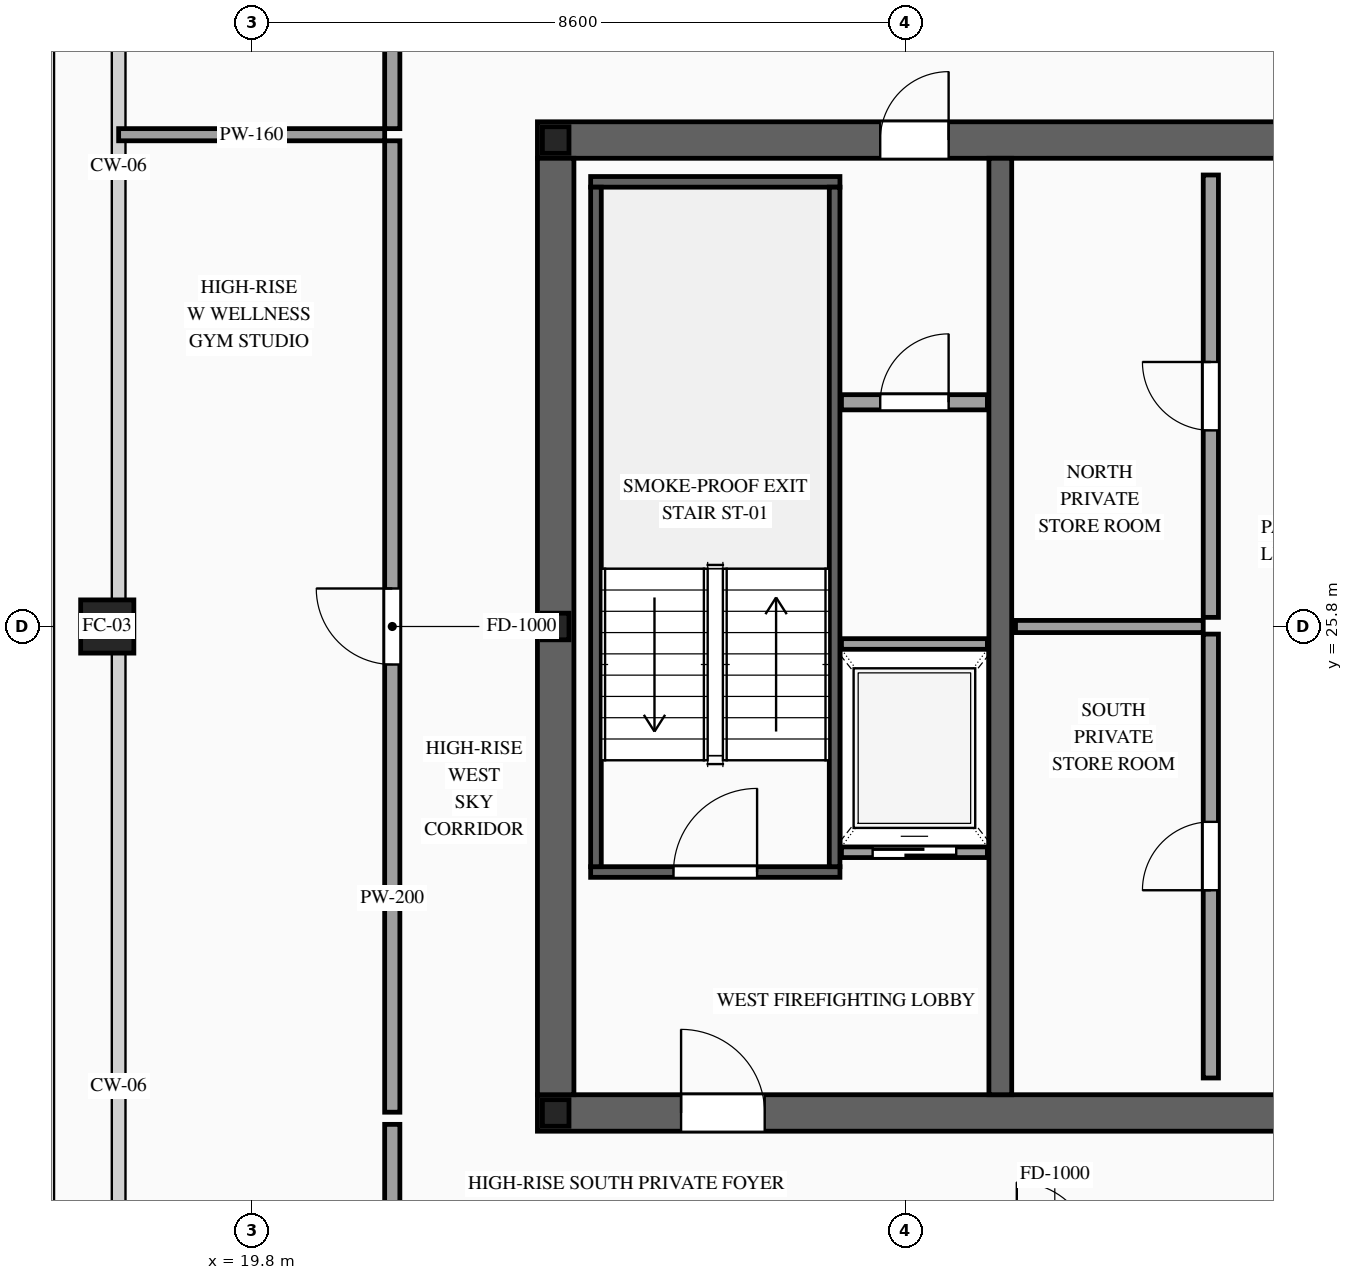
"""IFC4 building model, lengths in metres.
Left out: names, types, materials, properties, quantities, classifications, styles, units other than length and angle.
Written with IfcOpenShell. Run it as: python <this file> out.ifc"""

import sys

from ifc_helpers import new_model, si_unit, direction, frame, frame_2d, origin, origin_2d, place, context, subcontext, project, spatial, rectangle, hollow_rectangle, i_section, extrude, source, transform, mapped, element, fill, save


model = new_model("IFC4")
c1 = context("Model", 3, precision=1e-05, world=origin(), true_north=direction((0.0, 1.0)))
c2 = subcontext(c1, "Body", "Model", "MODEL_VIEW")
j1 = project(units=[si_unit("LENGTHUNIT", "METRE"), si_unit("PLANEANGLEUNIT", "RADIAN")], contexts=[c1])
p1 = place(None, origin())
s1 = spatial("IfcSite", under=j1, at=p1, CompositionType="ELEMENT")
p2 = place(p1, origin())
s2 = spatial("IfcBuilding", under=s1, at=p2, CompositionType="ELEMENT")
p3 = place(p2, frame((0.0, 0.0, 303.1)))
s3 = spatial("IfcBuildingStorey", under=s2, at=p3, CompositionType="ELEMENT", Elevation=303.1)
p4 = place(p3, frame((23.56, 19.4, 0.0), z_axis=(0.0, 0.0, 1.0), x_axis=(1.0, 0.0, 0.0)))
e1 = element("IfcWall", 1, at=p4, inside=s3, PredefinedType="SHEAR", context=c2, shape_type="SweptSolid", body=[
    extrude(rectangle(XDim=26.88, YDim=0.48, at=frame_2d((13.44, 0.0))), origin(), (0.0, 0.0, 1.0), 3.5),
])
p5 = place(p4, frame((1.89, 0.0, 0.0)))
e2 = element("IfcOpeningElement", 2, at=p5, cuts=e1, PredefinedType="OPENING", context=c2, shape_type="SweptSolid", body=[
    extrude(rectangle(XDim=1.1, YDim=2.2, at=frame_2d((0.55, 1.1))), frame((0.0, 0.255, 0.0), z_axis=(0.0, -1.0, 0.0), x_axis=(1.0, 0.0, 0.0)), (0.0, 0.0, 1.0), 0.51),
])
p6 = place(p4, frame((9.79, 0.0, 0.0)))
e3 = element("IfcOpeningElement", 3, at=p6, cuts=e1, PredefinedType="OPENING", context=c2, shape_type="SweptSolid", body=[
    extrude(rectangle(XDim=1.1, YDim=2.2, at=frame_2d((0.55, 1.1))), frame((0.0, 0.255, 0.0), z_axis=(0.0, -1.0, 0.0), x_axis=(1.0, 0.0, 0.0)), (0.0, 0.0, 1.0), 0.51),
])
p7 = place(p4, frame((22.99, 0.0, 0.0)))
e4 = element("IfcOpeningElement", 4, at=p7, cuts=e1, PredefinedType="OPENING", context=c2, shape_type="SweptSolid", body=[
    extrude(rectangle(XDim=1.1, YDim=2.2, at=frame_2d((0.55, 1.1))), frame((0.0, 0.255, 0.0), z_axis=(0.0, -1.0, 0.0), x_axis=(1.0, 0.0, 0.0)), (0.0, 0.0, 1.0), 0.51),
])
p8 = place(p4, frame((19.61, 0.0, 0.0)))
e5 = element("IfcOpeningElement", 5, at=p8, cuts=e1, PredefinedType="OPENING", context=c2, shape_type="SweptSolid", body=[
    extrude(rectangle(XDim=0.9, YDim=2.15, at=frame_2d((0.45, 1.075))), frame((0.0, 0.255, 0.0), z_axis=(0.0, -1.0, 0.0), x_axis=(1.0, 0.0, 0.0)), (0.0, 0.0, 1.0), 0.51),
])
p9 = place(p4, frame((18.17, 0.0, 0.0)))
e6 = element("IfcOpeningElement", 6, at=p9, cuts=e1, PredefinedType="OPENING", context=c2, shape_type="SweptSolid", body=[
    extrude(rectangle(XDim=0.9, YDim=2.15, at=frame_2d((0.45, 1.075))), frame((0.0, 0.255, 0.0), z_axis=(0.0, -1.0, 0.0), x_axis=(1.0, 0.0, 0.0)), (0.0, 0.0, 1.0), 0.51),
])
p10 = place(p3, frame((23.56, 32.2, 0.0), z_axis=(0.0, 0.0, 1.0), x_axis=(1.0, 0.0, 0.0)))
e7 = element("IfcWall", 7, at=p10, inside=s3, PredefinedType="SHEAR", context=c2, shape_type="SweptSolid", body=[
    extrude(rectangle(XDim=26.88, YDim=0.48, at=frame_2d((13.44, 0.0))), origin(), (0.0, 0.0, 1.0), 3.5),
])
p11 = place(p10, frame((4.51, 0.0, 0.0)))
e8 = element("IfcOpeningElement", 8, at=p11, cuts=e7, PredefinedType="OPENING", context=c2, shape_type="SweptSolid", body=[
    extrude(rectangle(XDim=0.9, YDim=2.15, at=frame_2d((0.45, 1.075))), frame((0.0, 0.255, 0.0), z_axis=(0.0, -1.0, 0.0), x_axis=(1.0, 0.0, 0.0)), (0.0, 0.0, 1.0), 0.51),
])
p12 = place(p10, frame((9.79, 0.0, 0.0)))
e9 = element("IfcOpeningElement", 9, at=p12, cuts=e7, PredefinedType="OPENING", context=c2, shape_type="SweptSolid", body=[
    extrude(rectangle(XDim=1.1, YDim=2.2, at=frame_2d((0.55, 1.1))), frame((0.0, 0.255, 0.0), z_axis=(0.0, -1.0, 0.0), x_axis=(1.0, 0.0, 0.0)), (0.0, 0.0, 1.0), 0.51),
])
p13 = place(p10, frame((15.64, 0.0, 0.0)))
e10 = element("IfcOpeningElement", 10, at=p13, cuts=e7, PredefinedType="OPENING", context=c2, shape_type="SweptSolid", body=[
    extrude(rectangle(XDim=1.1, YDim=2.2, at=frame_2d((0.55, 1.1))), frame((0.0, 0.255, 0.0), z_axis=(0.0, -1.0, 0.0), x_axis=(1.0, 0.0, 0.0)), (0.0, 0.0, 1.0), 0.51),
])
p14 = place(p10, frame((18.74, 0.0, 0.0)))
e11 = element("IfcOpeningElement", 11, at=p14, cuts=e7, PredefinedType="OPENING", context=c2, shape_type="SweptSolid", body=[
    extrude(rectangle(XDim=1.1, YDim=2.2, at=frame_2d((0.55, 1.1))), frame((0.0, 0.255, 0.0), z_axis=(0.0, -1.0, 0.0), x_axis=(1.0, 0.0, 0.0)), (0.0, 0.0, 1.0), 0.51),
])
m1 = source(origin(), c2, "Body", "SweptSolid", [
    extrude(rectangle(XDim=12.32, YDim=0.48, at=frame_2d((6.16, 0.0))), origin(), (0.0, 0.0, 1.0), 3.5),
])
p15 = place(p3, frame((23.8, 19.64, 0.0), z_axis=(0.0, 0.0, 1.0), x_axis=(0.0, 1.0, 0.0)))
e12 = element("IfcWall", 12, at=p15, inside=s3, PredefinedType="SHEAR", context=c2, shape_type="MappedRepresentation", body=[
    mapped(m1, transform((0.0, 0.0, 0.0), scale=1.0)),
])
m2 = source(origin(), c2, "Body", "SweptSolid", [
    extrude(rectangle(XDim=12.32, YDim=0.3, at=frame_2d((6.16, 0.0))), origin(), (0.0, 0.0, 1.0), 3.5),
])
p16 = place(p3, frame((29.65, 19.64, 0.0), z_axis=(0.0, 0.0, 1.0), x_axis=(0.0, 1.0, 0.0)))
e13 = element("IfcWall", 13, at=p16, inside=s3, PredefinedType="SOLIDWALL", context=c2, shape_type="MappedRepresentation", body=[
    mapped(m2, transform((0.0, 0.0, 0.0), scale=1.0)),
])
m3 = source(origin(), c2, "Body", "SweptSolid", [
    extrude(i_section(OverallWidth=0.35, OverallDepth=0.35, WebThickness=0.012, FlangeThickness=0.019, at=origin_2d()), origin(), (0.0, 0.0, 1.0), 3.5),
])
for number, where, z_axis, x_axis in (
    (14, (23.8, 19.4, 0.0), (0.0, 0.0, 1.0), (1.0, 0.0, 0.0)),
    (15, (23.8, 25.8, 0.0), (0.0, 0.0, 1.0), (1.0, 0.0, 0.0)),
    (16, (23.8, 32.2, 0.0), (0.0, 0.0, 1.0), (1.0, 0.0, 0.0)),
):
    element("IfcColumn", number, at=place(p3, frame(where, z_axis=z_axis, x_axis=x_axis)), inside=s3, PredefinedType="COLUMN", context=c2, shape_type="MappedRepresentation", body=[
        mapped(m3, transform((0.0, 0.0, 0.0), scale=1.0)),
    ])
m4 = source(origin(), c2, "Body", "SweptSolid", [
    extrude(hollow_rectangle(XDim=0.7, YDim=0.7, WallThickness=0.032, at=origin_2d()), origin(), (0.0, 0.0, 1.0), 3.5),
])
p17 = place(p3, frame((17.9, 25.8, 0.0), z_axis=(0.0, 0.0, 1.0), x_axis=(1.0, 0.0, 0.0)))
e17 = element("IfcColumn", 17, at=p17, inside=s3, PredefinedType="COLUMN", context=c2, shape_type="MappedRepresentation", body=[
    mapped(m4, transform((0.0, 0.0, 0.0), scale=1.0)),
])
p18 = place(p3, frame((27.56, 22.83, 0.0), z_axis=(0.0, 0.0, 1.0), x_axis=(1.0, 0.0, 0.0)))
e18 = element("IfcWall", 18, at=p18, inside=s3, PredefinedType="SOLIDWALL", context=c2, shape_type="SweptSolid", body=[
    extrude(rectangle(XDim=1.92, YDim=0.14, at=frame_2d((0.96, 0.0))), origin(), (0.0, 0.0, 1.0), 3.22),
])
p19 = place(p18, frame((0.41, 0.0, 0.0)))
e19 = element("IfcOpeningElement", 19, at=p19, cuts=e18, PredefinedType="OPENING", context=c2, shape_type="SweptSolid", body=[
    extrude(rectangle(XDim=1.1, YDim=2.2, at=frame_2d((0.55, 1.1))), frame((0.0, 0.085, 0.0), z_axis=(0.0, -1.0, 0.0), x_axis=(1.0, 0.0, 0.0)), (0.0, 0.0, 1.0), 0.17),
])
m5 = source(origin(), c2, "Body", "SweptSolid", [
    extrude(rectangle(XDim=1.92, YDim=0.14, at=frame_2d((0.96, 0.0))), origin(), (0.0, 0.0, 1.0), 3.22),
])
p20 = place(p3, frame((27.56, 25.57, 0.0), z_axis=(0.0, 0.0, 1.0), x_axis=(1.0, 0.0, 0.0)))
e20 = element("IfcWall", 20, at=p20, inside=s3, PredefinedType="SOLIDWALL", context=c2, shape_type="MappedRepresentation", body=[
    mapped(m5, transform((0.0, 0.0, 0.0), scale=1.0)),
])
p21 = place(p3, frame((24.26, 22.57, 0.0), z_axis=(0.0, 0.0, 1.0), x_axis=(1.0, 0.0, 0.0)))
e21 = element("IfcWall", 21, at=p21, inside=s3, PredefinedType="SOLIDWALL", context=c2, shape_type="SweptSolid", body=[
    extrude(rectangle(XDim=3.28, YDim=0.14, at=frame_2d((1.64, 0.0))), origin(), (0.0, 0.0, 1.0), 3.22),
])
p22 = place(p21, frame((1.09, 0.0, 0.0)))
e22 = element("IfcOpeningElement", 22, at=p22, cuts=e21, PredefinedType="OPENING", context=c2, shape_type="SweptSolid", body=[
    extrude(rectangle(XDim=1.1, YDim=2.2, at=frame_2d((0.55, 1.1))), frame((0.0, 0.085, 0.0), z_axis=(0.0, -1.0, 0.0), x_axis=(1.0, 0.0, 0.0)), (0.0, 0.0, 1.0), 0.17),
])
m6 = source(origin(), c2, "Body", "SweptSolid", [
    extrude(rectangle(XDim=3.28, YDim=0.14, at=frame_2d((1.64, 0.0))), origin(), (0.0, 0.0, 1.0), 3.22),
])
p23 = place(p3, frame((24.26, 31.65, 0.0), z_axis=(0.0, 0.0, 1.0), x_axis=(1.0, 0.0, 0.0)))
e23 = element("IfcWall", 23, at=p23, inside=s3, PredefinedType="SOLIDWALL", context=c2, shape_type="MappedRepresentation", body=[
    mapped(m6, transform((0.0, 0.0, 0.0), scale=1.0)),
])
m7 = source(origin(), c2, "Body", "SweptSolid", [
    extrude(rectangle(XDim=8.94, YDim=0.14, at=frame_2d((4.47, 0.0))), origin(), (0.0, 0.0, 1.0), 3.22),
])
for number, where, z_axis, x_axis in (
    (24, (24.33, 22.64, 0.0), (0.0, 0.0, 1.0), (0.0, 1.0, 0.0)),
    (25, (27.47, 22.64, 0.0), (0.0, 0.0, 1.0), (0.0, 1.0, 0.0)),
):
    element("IfcWall", number, at=place(p3, frame(where, z_axis=z_axis, x_axis=x_axis)), inside=s3, PredefinedType="SOLIDWALL", context=c2, shape_type="MappedRepresentation", body=[
        mapped(m7, transform((0.0, 0.0, 0.0), scale=1.0)),
    ])
p24 = place(p3, frame((27.56, 28.75, 0.0), z_axis=(0.0, 0.0, 1.0), x_axis=(1.0, 0.0, 0.0)))
e26 = element("IfcWall", 26, at=p24, inside=s3, PredefinedType="PARTITIONING", context=c2, shape_type="SweptSolid", body=[
    extrude(rectangle(XDim=1.92, YDim=0.2, at=frame_2d((0.96, 0.0))), origin(), (0.0, 0.0, 1.0), 3.22),
])
p25 = place(p24, frame((0.51, 0.0, 0.0)))
e27 = element("IfcOpeningElement", 27, at=p25, cuts=e26, PredefinedType="OPENING", context=c2, shape_type="SweptSolid", body=[
    extrude(rectangle(XDim=0.9, YDim=2.15, at=frame_2d((0.45, 1.075))), frame((0.0, 0.115, 0.0), z_axis=(0.0, -1.0, 0.0), x_axis=(1.0, 0.0, 0.0)), (0.0, 0.0, 1.0), 0.23),
])
p26 = place(p3, frame((32.42, 19.86, 0.0), z_axis=(0.0, 0.0, 1.0), x_axis=(0.0, 1.0, 0.0)))
e28 = element("IfcWall", 28, at=p26, inside=s3, PredefinedType="PARTITIONING", context=c2, shape_type="SweptSolid", body=[
    extrude(rectangle(XDim=5.84, YDim=0.2, at=frame_2d((2.92, 0.0))), origin(), (0.0, 0.0, 1.0), 3.22),
])
p27 = place(p26, frame((2.47, 0.0, 0.0)))
e29 = element("IfcOpeningElement", 29, at=p27, cuts=e28, PredefinedType="OPENING", context=c2, shape_type="SweptSolid", body=[
    extrude(rectangle(XDim=0.9, YDim=2.15, at=frame_2d((0.45, 1.075))), frame((0.0, 0.115, 0.0), z_axis=(0.0, -1.0, 0.0), x_axis=(1.0, 0.0, 0.0)), (0.0, 0.0, 1.0), 0.23),
])
p28 = place(p3, frame((32.42, 25.92, 0.0), z_axis=(0.0, 0.0, 1.0), x_axis=(0.0, 1.0, 0.0)))
e30 = element("IfcWall", 30, at=p28, inside=s3, PredefinedType="PARTITIONING", context=c2, shape_type="SweptSolid", body=[
    extrude(rectangle(XDim=5.82, YDim=0.2, at=frame_2d((2.91, 0.0))), origin(), (0.0, 0.0, 1.0), 3.22),
])
p29 = place(p28, frame((2.46, 0.0, 0.0)))
e31 = element("IfcOpeningElement", 31, at=p29, cuts=e30, PredefinedType="OPENING", context=c2, shape_type="SweptSolid", body=[
    extrude(rectangle(XDim=0.9, YDim=2.15, at=frame_2d((0.45, 1.075))), frame((0.0, 0.115, 0.0), z_axis=(0.0, -1.0, 0.0), x_axis=(1.0, 0.0, 0.0)), (0.0, 0.0, 1.0), 0.23),
])
m8 = source(origin(), c2, "Body", "SweptSolid", [
    extrude(rectangle(XDim=2.47, YDim=0.16, at=frame_2d((1.235, 0.0))), origin(), (0.0, 0.0, 1.0), 3.22),
])
p30 = place(p3, frame((29.85, 25.8, 0.0), z_axis=(0.0, 0.0, 1.0), x_axis=(1.0, 0.0, 0.0)))
e32 = element("IfcWall", 32, at=p30, inside=s3, PredefinedType="PARTITIONING", context=c2, shape_type="MappedRepresentation", body=[
    mapped(m8, transform((0.0, 0.0, 0.0), scale=1.0)),
])
m9 = source(origin(), c2, "Body", "SweptSolid", [
    extrude(rectangle(XDim=1.7, YDim=0.2, at=frame_2d((0.85, 0.0))), origin(), (0.0, 0.0, 1.0), 3.22),
])
for number, where, z_axis, x_axis in (
    (33, (21.65, 32.35, 0.0), (0.0, 0.0, 1.0), (0.0, 1.0, 0.0)),
    (34, (21.65, 17.55, 0.0), (0.0, 0.0, 1.0), (0.0, 1.0, 0.0)),
):
    element("IfcWall", number, at=place(p3, frame(where, z_axis=z_axis, x_axis=x_axis)), inside=s3, PredefinedType="PARTITIONING", context=c2, shape_type="MappedRepresentation", body=[
        mapped(m9, transform((0.0, 0.0, 0.0), scale=1.0)),
    ])
p31 = place(p3, frame((21.65, 19.41, 0.0), z_axis=(0.0, 0.0, 1.0), x_axis=(0.0, 1.0, 0.0)))
e35 = element("IfcWall", 35, at=p31, inside=s3, PredefinedType="PARTITIONING", context=c2, shape_type="SweptSolid", body=[
    extrude(rectangle(XDim=12.78, YDim=0.2, at=frame_2d((6.39, 0.0))), origin(), (0.0, 0.0, 1.0), 3.22),
])
p32 = place(p31, frame((5.89, 0.0, 0.0)))
e36 = element("IfcOpeningElement", 36, at=p32, cuts=e35, PredefinedType="OPENING", context=c2, shape_type="SweptSolid", body=[
    extrude(rectangle(XDim=1.0, YDim=2.2, at=frame_2d((0.5, 1.1))), frame((0.0, 0.115, 0.0), z_axis=(0.0, -1.0, 0.0), x_axis=(1.0, 0.0, 0.0)), (0.0, 0.0, 1.0), 0.23),
])
m10 = source(origin(), c2, "Body", "SweptSolid", [
    extrude(rectangle(XDim=3.5, YDim=0.16, at=frame_2d((1.75, 0.0))), origin(), (0.0, 0.0, 1.0), 2.765),
])
p33 = place(p3, frame((18.05, 32.27, 0.0), z_axis=(0.0, 0.0, 1.0), x_axis=(1.0, 0.0, 0.0)))
e37 = element("IfcWall", 37, at=p33, inside=s3, PredefinedType="PARTITIONING", context=c2, shape_type="MappedRepresentation", body=[
    mapped(m10, transform((0.0, 0.0, 0.0), scale=1.0)),
])
m11 = source(origin(), c2, "Body", "SweptSolid", [
    extrude(rectangle(XDim=1.1, YDim=2.2, at=frame_2d((0.55, 1.1))), frame((0.0, 0.025, 0.0), z_axis=(0.0, -1.0, 0.0), x_axis=(1.0, 0.0, 0.0)), (0.0, 0.0, 1.0), 0.05),
])
p34 = place(p19, origin())
e38 = element("IfcDoor", 38, at=p34, inside=s3, OperationType="SLIDING_TO_LEFT", PredefinedType="DOOR", context=c2, shape_type="MappedRepresentation", body=[
    mapped(m11, transform((0.0, 0.0, 0.0), scale=1.0)),
])
fill(e19, e38)
m12 = source(origin(), c2, "Body", "SweptSolid", [
    extrude(rectangle(XDim=1.1, YDim=2.2, at=frame_2d((0.55, 1.1))), frame((0.0, 0.025, 0.0), z_axis=(0.0, -1.0, 0.0), x_axis=(1.0, 0.0, 0.0)), (0.0, 0.0, 1.0), 0.05),
])
p35 = place(p22, origin())
e39 = element("IfcDoor", 39, at=p35, inside=s3, OperationType="SINGLE_SWING_RIGHT", PredefinedType="DOOR", context=c2, shape_type="MappedRepresentation", body=[
    mapped(m12, transform((0.0, 0.0, 0.0), scale=1.0)),
])
fill(e22, e39)
p36 = place(p5, origin())
e40 = element("IfcDoor", 40, at=p36, inside=s3, OperationType="SINGLE_SWING_LEFT", PredefinedType="DOOR", context=c2, shape_type="MappedRepresentation", body=[
    mapped(m12, transform((0.0, 0.0, 0.0), scale=1.0)),
])
fill(e2, e40)
m13 = source(origin(), c2, "Body", "SweptSolid", [
    extrude(rectangle(XDim=0.9, YDim=2.15, at=frame_2d((0.45, 1.075))), frame((0.0, 0.025, 0.0), z_axis=(0.0, -1.0, 0.0), x_axis=(1.0, 0.0, 0.0)), (0.0, 0.0, 1.0), 0.05),
])
p37 = place(p11, origin())
e41 = element("IfcDoor", 41, at=p37, inside=s3, OperationType="SINGLE_SWING_RIGHT", PredefinedType="DOOR", context=c2, shape_type="MappedRepresentation", body=[
    mapped(m13, transform((0.0, 0.0, 0.0), scale=1.0)),
])
fill(e8, e41)
p38 = place(p25, origin())
e42 = element("IfcDoor", 42, at=p38, inside=s3, OperationType="SINGLE_SWING_RIGHT", PredefinedType="DOOR", context=c2, shape_type="MappedRepresentation", body=[
    mapped(m13, transform((0.0, 0.0, 0.0), scale=1.0)),
])
fill(e27, e42)
p39 = place(p27, origin())
e43 = element("IfcDoor", 43, at=p39, inside=s3, OperationType="SINGLE_SWING_LEFT", PredefinedType="DOOR", context=c2, shape_type="MappedRepresentation", body=[
    mapped(m13, transform((0.0, 0.0, 0.0), scale=1.0)),
])
fill(e29, e43)
p40 = place(p29, origin())
e44 = element("IfcDoor", 44, at=p40, inside=s3, OperationType="SINGLE_SWING_RIGHT", PredefinedType="DOOR", context=c2, shape_type="MappedRepresentation", body=[
    mapped(m13, transform((0.0, 0.0, 0.0), scale=1.0)),
])
fill(e31, e44)
m14 = source(origin(), c2, "Body", "SweptSolid", [
    extrude(rectangle(XDim=1.0, YDim=2.2, at=frame_2d((0.5, 1.1))), frame((0.0, 0.025, 0.0), z_axis=(0.0, -1.0, 0.0), x_axis=(1.0, 0.0, 0.0)), (0.0, 0.0, 1.0), 0.05),
])
p41 = place(p32, origin())
e45 = element("IfcDoor", 45, at=p41, inside=s3, OperationType="SINGLE_SWING_RIGHT", PredefinedType="DOOR", context=c2, shape_type="MappedRepresentation", body=[
    mapped(m14, transform((0.0, 0.0, 0.0), scale=1.0)),
])
fill(e36, e45)
save(model, sys.argv[1])
